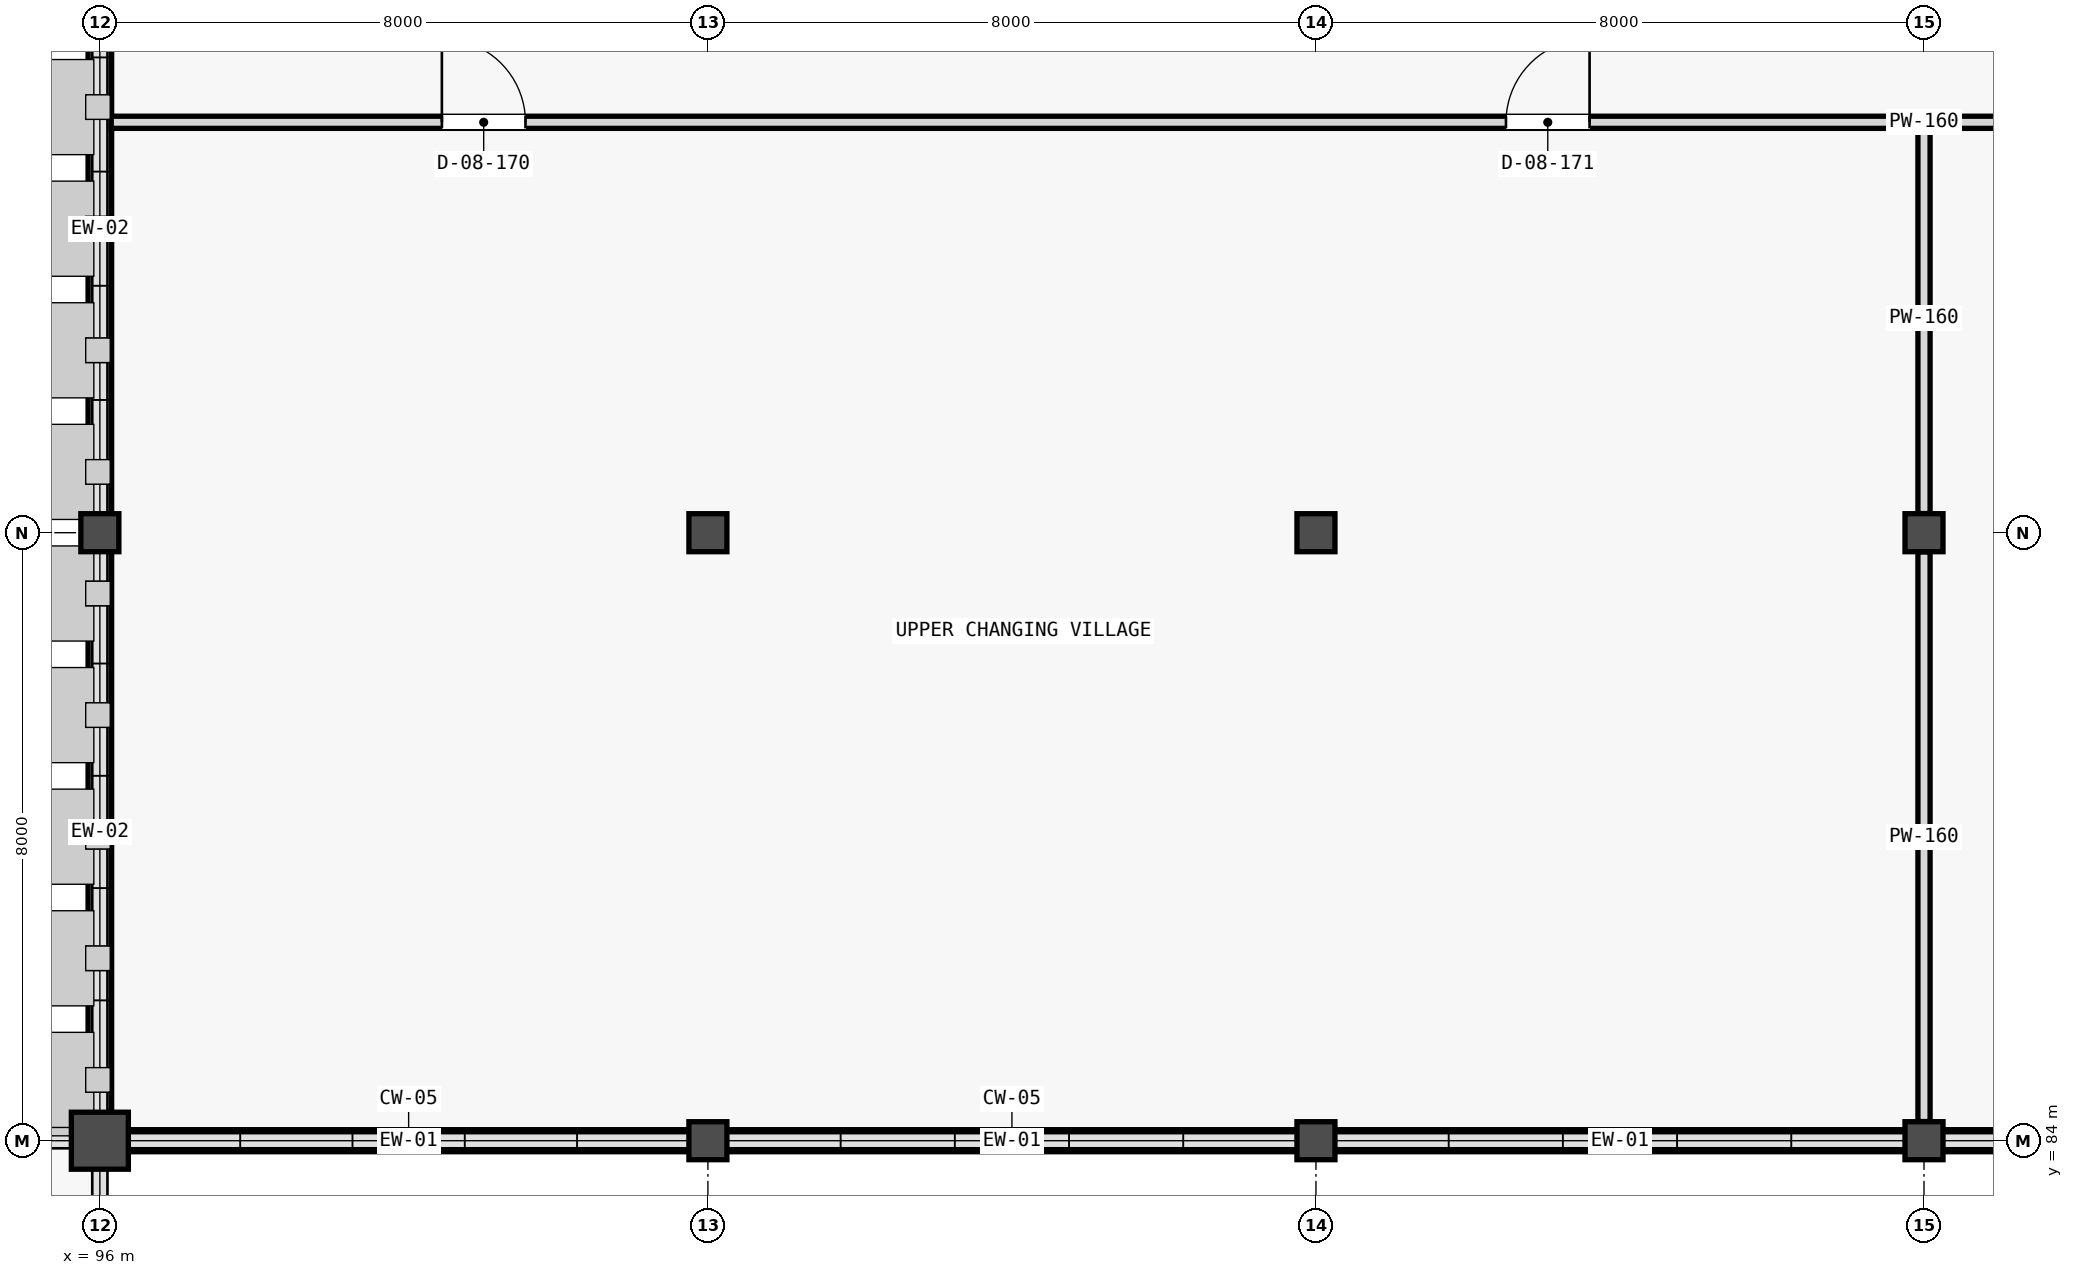
"""IFC4 building model, lengths in metres.
Left out: names, types, materials, properties, quantities, classifications, styles, units other than length and angle.
Written with IfcOpenShell. Run it as: python <this file> out.ifc"""

import sys

from ifc_helpers import new_model, si_unit, direction, frame, frame_2d, origin, origin_2d, place, context, subcontext, project, spatial, rectangle, extrude, element, fill, save


model = new_model("IFC4")
c1 = context("Model", 3, precision=1e-05, world=origin(), true_north=direction((0.0, 1.0)))
c2 = subcontext(c1, "Body", "Model", "MODEL_VIEW")
j1 = project(units=[si_unit("LENGTHUNIT", "METRE"), si_unit("PLANEANGLEUNIT", "RADIAN")], contexts=[c1])
p1 = place(None, origin())
s1 = spatial("IfcSite", under=j1, at=p1, CompositionType="ELEMENT")
p2 = place(p1, origin())
s2 = spatial("IfcBuilding", under=s1, at=p2, CompositionType="ELEMENT")
p3 = place(p2, frame((0.0, 0.0, 5.4)))
s3 = spatial("IfcBuildingStorey", under=s2, at=p3, CompositionType="ELEMENT", Elevation=5.4)
p4 = place(p3, frame((96.0, 84.0, 0.0), z_axis=(0.0, 0.0, 1.0), x_axis=(1.0, 0.0, 0.0)))
e1 = element("IfcColumn", 1, at=p4, inside=s3, PredefinedType="COLUMN", context=c2, shape_type="SweptSolid", body=[
    extrude(rectangle(XDim=0.75, YDim=0.75, at=origin_2d()), origin(), (0.0, 0.0, 1.0), 4.57),
])
for number, where, z_axis, x_axis in (
    (2, (96.0, 92.0, 0.0), (0.0, 0.0, 1.0), (1.0, 0.0, 0.0)),
    (3, (104.0, 84.0, 0.0), (0.0, 0.0, 1.0), (1.0, 0.0, 0.0)),
    (4, (104.0, 92.0, 0.0), (0.0, 0.0, 1.0), (1.0, 0.0, 0.0)),
    (5, (112.0, 84.0, 0.0), (0.0, 0.0, 1.0), (1.0, 0.0, 0.0)),
    (6, (112.0, 92.0, 0.0), (0.0, 0.0, 1.0), (1.0, 0.0, 0.0)),
    (7, (120.0, 84.0, 0.0), (0.0, 0.0, 1.0), (1.0, 0.0, 0.0)),
    (8, (120.0, 92.0, 0.0), (0.0, 0.0, 1.0), (1.0, 0.0, 0.0)),
):
    element("IfcColumn", number, at=place(p3, frame(where, z_axis=z_axis, x_axis=x_axis)), inside=s3, PredefinedType="COLUMN", context=c2, shape_type="SweptSolid", body=[
        extrude(rectangle(XDim=0.5, YDim=0.5, at=origin_2d()), origin(), (0.0, 0.0, 1.0), 4.57),
    ])
p5 = place(p3, frame((96.371, 84.0, 0.0), z_axis=(0.0, 0.0, 1.0), x_axis=(1.0, 0.0, 0.0)))
e9 = element("IfcWall", 9, at=p5, inside=s3, PredefinedType="STANDARD", context=c2, shape_type="SweptSolid", body=[
    extrude(rectangle(XDim=7.383, YDim=0.29, at=frame_2d((3.691, 0.0))), origin(), (0.0, 0.0, 1.0), 1.4),
])
for number, where, z_axis, x_axis in (
    (10, (104.246, 84.0, 0.0), (0.0, 0.0, 1.0), (1.0, 0.0, 0.0)),
    (11, (112.246, 84.0, 0.0), (0.0, 0.0, 1.0), (1.0, 0.0, 0.0)),
    (12, (120.246, 84.0, 0.0), (0.0, 0.0, 1.0), (1.0, 0.0, 0.0)),
):
    element("IfcWall", number, at=place(p3, frame(where, z_axis=z_axis, x_axis=x_axis)), inside=s3, PredefinedType="STANDARD", context=c2, shape_type="SweptSolid", body=[
        extrude(rectangle(XDim=7.508, YDim=0.29, at=frame_2d((3.754, 0.0))), origin(), (0.0, 0.0, 1.0), 1.4),
    ])
p6 = place(p3, frame((96.0, 84.371, 0.0), z_axis=(0.0, 0.0, 1.0), x_axis=(0.0, 1.0, 0.0)))
e13 = element("IfcWall", 13, at=p6, inside=s3, PredefinedType="STANDARD", context=c2, shape_type="SweptSolid", body=[
    extrude(rectangle(XDim=7.383, YDim=0.31, at=frame_2d((3.691, 0.0))), origin(), (0.0, 0.0, 1.0), 1.25),
])
p7 = place(p3, frame((96.0, 92.246, 0.0), z_axis=(0.0, 0.0, 1.0), x_axis=(0.0, 1.0, 0.0)))
e14 = element("IfcWall", 14, at=p7, inside=s3, PredefinedType="STANDARD", context=c2, shape_type="SweptSolid", body=[
    extrude(rectangle(XDim=7.508, YDim=0.31, at=frame_2d((3.754, 0.0))), origin(), (0.0, 0.0, 1.0), 1.25),
])
p8 = place(p3, frame((96.15, 97.4, 0.0), z_axis=(0.0, 0.0, 1.0), x_axis=(1.0, 0.0, 0.0)))
e15 = element("IfcWall", 15, at=p8, inside=s3, PredefinedType="PARTITIONING", context=c2, shape_type="SweptSolid", body=[
    extrude(rectangle(XDim=47.7, YDim=0.16, at=frame_2d((23.85, 0.0))), origin(), (0.0, 0.0, 1.0), 3.83),
])
p9 = place(p8, frame((4.35, 0.0, 0.0)))
e16 = element("IfcOpeningElement", 16, at=p9, cuts=e15, PredefinedType="OPENING", context=c2, shape_type="SweptSolid", body=[
    extrude(rectangle(XDim=1.1, YDim=2.15, at=frame_2d((0.55, 1.075))), frame((0.0, 0.09, 0.0), z_axis=(0.0, -1.0, 0.0), x_axis=(1.0, 0.0, 0.0)), (0.0, 0.0, 1.0), 0.18),
])
p10 = place(p8, frame((18.35, 0.0, 0.0)))
e17 = element("IfcOpeningElement", 17, at=p10, cuts=e15, PredefinedType="OPENING", context=c2, shape_type="SweptSolid", body=[
    extrude(rectangle(XDim=1.1, YDim=2.15, at=frame_2d((0.55, 1.075))), frame((0.0, 0.09, 0.0), z_axis=(0.0, -1.0, 0.0), x_axis=(1.0, 0.0, 0.0)), (0.0, 0.0, 1.0), 0.18),
])
p11 = place(p8, frame((29.35, 0.0, 0.0)))
e18 = element("IfcOpeningElement", 18, at=p11, cuts=e15, PredefinedType="OPENING", context=c2, shape_type="SweptSolid", body=[
    extrude(rectangle(XDim=1.15, YDim=2.15, at=frame_2d((0.575, 1.075))), frame((0.0, 0.09, 0.0), z_axis=(0.0, -1.0, 0.0), x_axis=(1.0, 0.0, 0.0)), (0.0, 0.0, 1.0), 0.18),
])
p12 = place(p8, frame((42.35, 0.0, 0.0)))
e19 = element("IfcOpeningElement", 19, at=p12, cuts=e15, PredefinedType="OPENING", context=c2, shape_type="SweptSolid", body=[
    extrude(rectangle(XDim=1.15, YDim=2.15, at=frame_2d((0.575, 1.075))), frame((0.0, 0.09, 0.0), z_axis=(0.0, -1.0, 0.0), x_axis=(1.0, 0.0, 0.0)), (0.0, 0.0, 1.0), 0.18),
])
p13 = place(p3, frame((120.0, 84.252, 0.0), z_axis=(0.0, 0.0, 1.0), x_axis=(0.0, 1.0, 0.0)))
e20 = element("IfcWall", 20, at=p13, inside=s3, PredefinedType="PARTITIONING", context=c2, shape_type="SweptSolid", body=[
    extrude(rectangle(XDim=7.496, YDim=0.16, at=frame_2d((3.748, 0.0))), origin(), (0.0, 0.0, 1.0), 3.83),
])
p14 = place(p3, frame((120.0, 92.252, 0.0), z_axis=(0.0, 0.0, 1.0), x_axis=(0.0, 1.0, 0.0)))
e21 = element("IfcWall", 21, at=p14, inside=s3, PredefinedType="PARTITIONING", context=c2, shape_type="SweptSolid", body=[
    extrude(rectangle(XDim=5.148, YDim=0.16, at=frame_2d((2.574, 0.0))), origin(), (0.0, 0.0, 1.0), 3.83),
])
p15 = place(p9, origin())
e22 = element("IfcDoor", 22, at=p15, inside=s3, OperationType="SINGLE_SWING_LEFT", PredefinedType="DOOR", context=c2, shape_type="SweptSolid", body=[
    extrude(rectangle(XDim=1.1, YDim=2.15, at=frame_2d((0.55, 1.075))), frame((0.0, 0.025, 0.0), z_axis=(0.0, -1.0, 0.0), x_axis=(1.0, 0.0, 0.0)), (0.0, 0.0, 1.0), 0.05),
])
fill(e16, e22)
p16 = place(p10, origin())
e23 = element("IfcDoor", 23, at=p16, inside=s3, OperationType="SINGLE_SWING_RIGHT", PredefinedType="DOOR", context=c2, shape_type="SweptSolid", body=[
    extrude(rectangle(XDim=1.1, YDim=2.15, at=frame_2d((0.55, 1.075))), frame((0.0, 0.025, 0.0), z_axis=(0.0, -1.0, 0.0), x_axis=(1.0, 0.0, 0.0)), (0.0, 0.0, 1.0), 0.05),
])
fill(e17, e23)
save(model, sys.argv[1])
